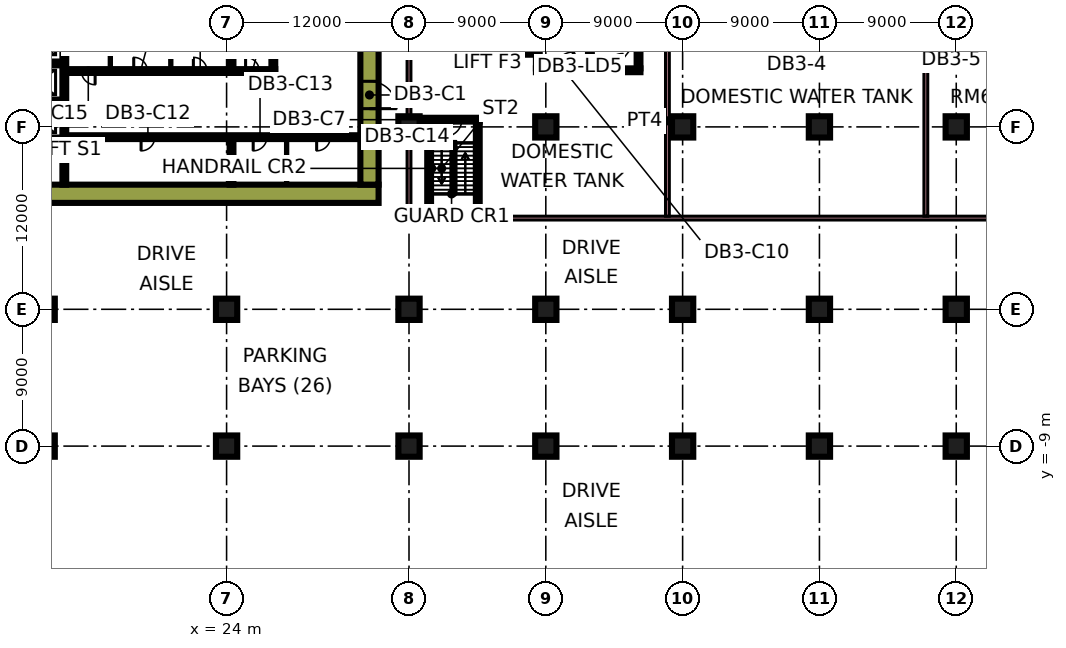
"""IFC4 building model, lengths in metres.
Left out: names, types, materials, properties, quantities, classifications, styles, units other than length and angle.
Written with IfcOpenShell. Run it as: python <this file> out.ifc"""

import sys

from ifc_helpers import new_model, si_unit, direction, frame, frame_2d, origin, origin_2d, place, context, subcontext, project, spatial, rectangle, extrude, element, fill, save


model = new_model("IFC4")
c1 = context("Model", 3, precision=1e-05, world=origin(), true_north=direction((0.0, 1.0)))
c2 = subcontext(c1, "Body", "Model", "MODEL_VIEW")
j1 = project(units=[si_unit("LENGTHUNIT", "METRE"), si_unit("PLANEANGLEUNIT", "RADIAN")], contexts=[c1])
p1 = place(None, origin())
s1 = spatial("IfcSite", under=j1, at=p1, CompositionType="ELEMENT")
p2 = place(p1, origin())
s2 = spatial("IfcBuilding", under=s1, at=p2, CompositionType="ELEMENT")
p3 = place(p2, frame((0.0, 0.0, -13.5)))
s3 = spatial("IfcBuildingStorey", under=s2, at=p3, CompositionType="ELEMENT", Elevation=-13.5)
for number, where, z_axis, x_axis in (
    (1, (12.0, -9.0, 0.0), (0.0, 0.0, 1.0), (1.0, 0.0, 0.0)),
    (2, (12.0, 0.0, 0.0), (0.0, 0.0, 1.0), (1.0, 0.0, 0.0)),
    (3, (24.0, -9.0, 0.0), (0.0, 0.0, 1.0), (1.0, 0.0, 0.0)),
    (4, (24.0, 0.0, 0.0), (0.0, 0.0, 1.0), (1.0, 0.0, 0.0)),
    (5, (36.0, -9.0, 0.0), (0.0, 0.0, 1.0), (1.0, 0.0, 0.0)),
    (6, (36.0, 0.0, 0.0), (0.0, 0.0, 1.0), (1.0, 0.0, 0.0)),
    (7, (36.0, 12.0, 0.0), (0.0, 0.0, 1.0), (1.0, 0.0, 0.0)),
    (8, (45.0, -9.0, 0.0), (0.0, 0.0, 1.0), (1.0, 0.0, 0.0)),
    (9, (45.0, 0.0, 0.0), (0.0, 0.0, 1.0), (1.0, 0.0, 0.0)),
    (10, (45.0, 12.0, 0.0), (0.0, 0.0, 1.0), (1.0, 0.0, 0.0)),
    (11, (54.0, -9.0, 0.0), (0.0, 0.0, 1.0), (1.0, 0.0, 0.0)),
    (12, (54.0, 0.0, 0.0), (0.0, 0.0, 1.0), (1.0, 0.0, 0.0)),
    (13, (54.0, 12.0, 0.0), (0.0, 0.0, 1.0), (1.0, 0.0, 0.0)),
    (14, (63.0, -9.0, 0.0), (0.0, 0.0, 1.0), (1.0, 0.0, 0.0)),
    (15, (63.0, 0.0, 0.0), (0.0, 0.0, 1.0), (1.0, 0.0, 0.0)),
    (16, (63.0, 12.0, 0.0), (0.0, 0.0, 1.0), (1.0, 0.0, 0.0)),
    (17, (72.0, -9.0, 0.0), (0.0, 0.0, 1.0), (1.0, 0.0, 0.0)),
    (18, (72.0, 0.0, 0.0), (0.0, 0.0, 1.0), (1.0, 0.0, 0.0)),
    (19, (72.0, 12.0, 0.0), (0.0, 0.0, 1.0), (1.0, 0.0, 0.0)),
):
    element("IfcColumn", number, at=place(p3, frame(where, z_axis=z_axis, x_axis=x_axis)), inside=s3, PredefinedType="COLUMN", context=c2, shape_type="SweptSolid", body=[
        extrude(rectangle(XDim=1.4, YDim=1.4, at=origin_2d()), origin(), (0.0, 0.0, 1.0), 4.5),
    ])
p4 = place(p3, frame((9.0, 7.6, 0.0), z_axis=(0.0, 0.0, 1.0), x_axis=(1.0, 0.0, 0.0)))
e20 = element("IfcWall", 20, at=p4, inside=s3, PredefinedType="SHEAR", context=c2, shape_type="SweptSolid", body=[
    extrude(rectangle(XDim=25.0, YDim=1.2, at=frame_2d((12.5, 0.0))), origin(), (0.0, 0.0, 1.0), 4.5),
])
p5 = place(p3, frame((33.4, 8.2, 0.0), z_axis=(0.0, 0.0, 1.0), x_axis=(0.0, 1.0, 0.0)))
e21 = element("IfcWall", 21, at=p5, inside=s3, PredefinedType="SHEAR", context=c2, shape_type="SweptSolid", body=[
    extrude(rectangle(XDim=10.6, YDim=1.2, at=frame_2d((5.3, 0.0))), origin(), (0.0, 0.0, 1.0), 4.5),
])
p6 = place(p5, frame((5.0, 0.0, 0.0)))
e22 = element("IfcOpeningElement", 22, at=p6, cuts=e21, PredefinedType="OPENING", context=c2, shape_type="SweptSolid", body=[
    extrude(rectangle(XDim=1.8, YDim=2.4, at=frame_2d((0.9, 1.2))), frame((0.0, 0.61, 0.0), z_axis=(0.0, -1.0, 0.0), x_axis=(1.0, 0.0, 0.0)), (0.0, 0.0, 1.0), 1.22),
])
p7 = place(p3, frame((13.325, 8.2, 0.0), z_axis=(0.0, 0.0, 1.0), x_axis=(0.0, 1.0, 0.0)))
e23 = element("IfcWall", 23, at=p7, inside=s3, PredefinedType="SHEAR", context=c2, shape_type="SweptSolid", body=[
    extrude(rectangle(XDim=10.6, YDim=0.25, at=frame_2d((5.3, 0.0))), origin(), (0.0, 0.0, 1.0), 4.5),
])
p8 = place(p3, frame((13.45, 11.325, 0.0), z_axis=(0.0, 0.0, 1.0), x_axis=(1.0, 0.0, 0.0)))
e24 = element("IfcWall", 24, at=p8, inside=s3, PredefinedType="SHEAR", context=c2, shape_type="SweptSolid", body=[
    extrude(rectangle(XDim=19.35, YDim=0.25, at=frame_2d((9.675, 0.0))), origin(), (0.0, 0.0, 1.0), 4.5),
])
p9 = place(p8, frame((4.925, 0.0, 0.0)))
e25 = element("IfcOpeningElement", 25, at=p9, cuts=e24, PredefinedType="OPENING", context=c2, shape_type="SweptSolid", body=[
    extrude(rectangle(XDim=0.9, YDim=2.1, at=frame_2d((0.45, 1.05))), frame((0.0, 0.135, 0.0), z_axis=(0.0, -1.0, 0.0), x_axis=(1.0, 0.0, 0.0)), (0.0, 0.0, 1.0), 0.27),
])
p10 = place(p8, frame((12.3, 0.0, 0.0)))
e26 = element("IfcOpeningElement", 26, at=p10, cuts=e24, PredefinedType="OPENING", context=c2, shape_type="SweptSolid", body=[
    extrude(rectangle(XDim=0.9, YDim=2.1, at=frame_2d((0.45, 1.05))), frame((0.0, 0.135, 0.0), z_axis=(0.0, -1.0, 0.0), x_axis=(1.0, 0.0, 0.0)), (0.0, 0.0, 1.0), 0.27),
])
p11 = place(p8, frame((16.475, 0.0, 0.0)))
e27 = element("IfcOpeningElement", 27, at=p11, cuts=e24, PredefinedType="OPENING", context=c2, shape_type="SweptSolid", body=[
    extrude(rectangle(XDim=0.9, YDim=2.1, at=frame_2d((0.45, 1.05))), frame((0.0, 0.135, 0.0), z_axis=(0.0, -1.0, 0.0), x_axis=(1.0, 0.0, 0.0)), (0.0, 0.0, 1.0), 0.27),
])
p12 = place(p3, frame((13.45, 15.675, 0.0), z_axis=(0.0, 0.0, 1.0), x_axis=(1.0, 0.0, 0.0)))
e28 = element("IfcWall", 28, at=p12, inside=s3, PredefinedType="SHEAR", context=c2, shape_type="SweptSolid", body=[
    extrude(rectangle(XDim=13.75, YDim=0.25, at=frame_2d((6.875, 0.0))), origin(), (0.0, 0.0, 1.0), 4.5),
])
p13 = place(p12, frame((1.001, 0.0, 0.0)))
e29 = element("IfcOpeningElement", 29, at=p13, cuts=e28, PredefinedType="OPENING", context=c2, shape_type="SweptSolid", body=[
    extrude(rectangle(XDim=0.9, YDim=2.1, at=frame_2d((0.45, 1.05))), frame((0.0, 0.135, 0.0), z_axis=(0.0, -1.0, 0.0), x_axis=(1.0, 0.0, 0.0)), (0.0, 0.0, 1.0), 0.27),
])
p14 = place(p12, frame((4.441, 0.0, 0.0)))
e30 = element("IfcOpeningElement", 30, at=p14, cuts=e28, PredefinedType="OPENING", context=c2, shape_type="SweptSolid", body=[
    extrude(rectangle(XDim=0.9, YDim=2.1, at=frame_2d((0.45, 1.05))), frame((0.0, 0.135, 0.0), z_axis=(0.0, -1.0, 0.0), x_axis=(1.0, 0.0, 0.0)), (0.0, 0.0, 1.0), 0.27),
])
p15 = place(p12, frame((8.365, 0.0, 0.0)))
e31 = element("IfcOpeningElement", 31, at=p15, cuts=e28, PredefinedType="OPENING", context=c2, shape_type="SweptSolid", body=[
    extrude(rectangle(XDim=0.9, YDim=2.1, at=frame_2d((0.45, 1.05))), frame((0.0, 0.135, 0.0), z_axis=(0.0, -1.0, 0.0), x_axis=(1.0, 0.0, 0.0)), (0.0, 0.0, 1.0), 0.27),
])
p16 = place(p12, frame((11.8, 0.0, 0.0)))
e32 = element("IfcOpeningElement", 32, at=p16, cuts=e28, PredefinedType="OPENING", context=c2, shape_type="SweptSolid", body=[
    extrude(rectangle(XDim=0.9, YDim=2.1, at=frame_2d((0.45, 1.05))), frame((0.0, 0.135, 0.0), z_axis=(0.0, -1.0, 0.0), x_axis=(1.0, 0.0, 0.0)), (0.0, 0.0, 1.0), 0.27),
])
for number, where, z_axis, x_axis in (
    (33, (10.2, 11.175, 0.0), (0.0, 0.0, 1.0), (1.0, 0.0, 0.0)),
    (34, (10.2, 13.675, 0.0), (0.0, 0.0, 1.0), (1.0, 0.0, 0.0)),
    (35, (10.2, 16.175, 0.0), (0.0, 0.0, 1.0), (1.0, 0.0, 0.0)),
    (36, (24.325, 8.2, 0.0), (0.0, 0.0, 1.0), (0.0, 1.0, 0.0)),
    (37, (24.325, 15.8, 0.0), (0.0, 0.0, 1.0), (0.0, 1.0, 0.0)),
    (38, (27.075, 15.8, 0.0), (0.0, 0.0, 1.0), (0.0, 1.0, 0.0)),
):
    element("IfcWall", number, at=place(p3, frame(where, z_axis=z_axis, x_axis=x_axis)), inside=s3, PredefinedType="SHEAR", context=c2, shape_type="SweptSolid", body=[
        extrude(rectangle(XDim=3.0, YDim=0.25, at=frame_2d((1.5, 0.0))), origin(), (0.0, 0.0, 1.0), 4.5),
    ])
p17 = place(p3, frame((37.2, 5.725, 0.0), z_axis=(0.0, 0.0, 1.0), x_axis=(1.0, 0.0, 0.0)))
e39 = element("IfcWall", 39, at=p17, inside=s3, PredefinedType="SHEAR", context=c2, shape_type="SweptSolid", body=[
    extrude(rectangle(XDim=3.45, YDim=0.25, at=frame_2d((1.725, 0.0))), origin(), (0.0, 0.0, 1.0), 4.5),
])
p18 = place(p3, frame((36.7, 12.475, 0.0), z_axis=(0.0, 0.0, 1.0), x_axis=(1.0, 0.0, 0.0)))
e40 = element("IfcWall", 40, at=p18, inside=s3, PredefinedType="SHEAR", context=c2, shape_type="SweptSolid", body=[
    extrude(rectangle(XDim=3.95, YDim=0.25, at=frame_2d((1.975, 0.0))), origin(), (0.0, 0.0, 1.0), 4.5),
])
p19 = place(p18, frame((1.675, 0.0, 0.0)))
e41 = element("IfcOpeningElement", 41, at=p19, cuts=e40, PredefinedType="OPENING", context=c2, shape_type="SweptSolid", body=[
    extrude(rectangle(XDim=1.1, YDim=2.2, at=frame_2d((0.55, 1.1))), frame((0.0, 0.135, 0.0), z_axis=(0.0, -1.0, 0.0), x_axis=(1.0, 0.0, 0.0)), (0.0, 0.0, 1.0), 0.27),
])
for number, where, z_axis, x_axis in (
    (42, (37.325, 5.85, 0.0), (0.0, 0.0, 1.0), (0.0, 1.0, 0.0)),
    (43, (40.525, 5.85, 0.0), (0.0, 0.0, 1.0), (0.0, 1.0, 0.0)),
):
    element("IfcWall", number, at=place(p3, frame(where, z_axis=z_axis, x_axis=x_axis)), inside=s3, PredefinedType="SHEAR", context=c2, shape_type="SweptSolid", body=[
        extrude(rectangle(XDim=6.5, YDim=0.25, at=frame_2d((3.25, 0.0))), origin(), (0.0, 0.0, 1.0), 4.5),
    ])
p20 = place(p3, frame((47.775, 15.725, 0.0), z_axis=(0.0, 0.0, 1.0), x_axis=(1.0, 0.0, 0.0)))
e44 = element("IfcWall", 44, at=p20, inside=s3, PredefinedType="SHEAR", context=c2, shape_type="SweptSolid", body=[
    extrude(rectangle(XDim=3.45, YDim=0.25, at=frame_2d((1.725, 0.0))), origin(), (0.0, 0.0, 1.0), 4.5),
])
p21 = place(p20, frame((1.175, 0.0, 0.0)))
e45 = element("IfcOpeningElement", 45, at=p21, cuts=e44, PredefinedType="OPENING", context=c2, shape_type="SweptSolid", body=[
    extrude(rectangle(XDim=1.1, YDim=2.2, at=frame_2d((0.55, 1.1))), frame((0.0, 0.135, 0.0), z_axis=(0.0, -1.0, 0.0), x_axis=(1.0, 0.0, 0.0)), (0.0, 0.0, 1.0), 0.27),
])
p22 = place(p3, frame((47.9, 15.85, 0.0), z_axis=(0.0, 0.0, 1.0), x_axis=(0.0, 1.0, 0.0)))
e46 = element("IfcWall", 46, at=p22, inside=s3, PredefinedType="SHEAR", context=c2, shape_type="SweptSolid", body=[
    extrude(rectangle(XDim=6.5, YDim=0.25, at=frame_2d((3.25, 0.0))), origin(), (0.0, 0.0, 1.0), 4.5),
])
p23 = place(p22, frame((0.35, 0.0, 0.0)))
e47 = element("IfcOpeningElement", 47, at=p23, cuts=e46, PredefinedType="OPENING", context=c2, shape_type="SweptSolid", body=[
    extrude(rectangle(XDim=1.1, YDim=2.2, at=frame_2d((0.55, 1.1))), frame((0.0, 0.135, 0.0), z_axis=(0.0, -1.0, 0.0), x_axis=(1.0, 0.0, 0.0)), (0.0, 0.0, 1.0), 0.27),
])
p24 = place(p3, frame((51.1, 15.85, 0.0), z_axis=(0.0, 0.0, 1.0), x_axis=(0.0, 1.0, 0.0)))
e48 = element("IfcWall", 48, at=p24, inside=s3, PredefinedType="SHEAR", context=c2, shape_type="SweptSolid", body=[
    extrude(rectangle(XDim=6.5, YDim=0.25, at=frame_2d((3.25, 0.0))), origin(), (0.0, 0.0, 1.0), 4.5),
])
p25 = place(p3, frame((44.35, 15.725, 0.0), z_axis=(0.0, 0.0, 1.0), x_axis=(1.0, 0.0, 0.0)))
e49 = element("IfcWall", 49, at=p25, inside=s3, PredefinedType="SHEAR", context=c2, shape_type="SweptSolid", body=[
    extrude(rectangle(XDim=3.425, YDim=0.25, at=frame_2d((1.712, 0.0))), origin(), (0.0, 0.0, 1.0), 4.5),
])
p26 = place(p25, frame((1.25, 0.0, 0.0)))
e50 = element("IfcOpeningElement", 50, at=p26, cuts=e49, PredefinedType="OPENING", context=c2, shape_type="SweptSolid", body=[
    extrude(rectangle(XDim=1.2, YDim=2.2, at=frame_2d((0.6, 1.1))), frame((0.0, 0.135, 0.0), z_axis=(0.0, -1.0, 0.0), x_axis=(1.0, 0.0, 0.0)), (0.0, 0.0, 1.0), 0.27),
])
p27 = place(p3, frame((44.475, 15.85, 0.0), z_axis=(0.0, 0.0, 1.0), x_axis=(0.0, 1.0, 0.0)))
e51 = element("IfcWall", 51, at=p27, inside=s3, PredefinedType="SHEAR", context=c2, shape_type="SweptSolid", body=[
    extrude(rectangle(XDim=6.5, YDim=0.25, at=frame_2d((3.25, 0.0))), origin(), (0.0, 0.0, 1.0), 4.5),
])
p28 = place(p27, frame((1.75, 0.0, 0.0)))
e52 = element("IfcOpeningElement", 52, at=p28, cuts=e51, PredefinedType="OPENING", context=c2, shape_type="SweptSolid", body=[
    extrude(rectangle(XDim=1.1, YDim=2.2, at=frame_2d((0.55, 1.1))), frame((0.0, 0.135, 0.0), z_axis=(0.0, -1.0, 0.0), x_axis=(1.0, 0.0, 0.0)), (0.0, 0.0, 1.0), 0.27),
])
p29 = place(p27, frame((4.3, 0.0, 0.0)))
e53 = element("IfcOpeningElement", 53, at=p29, cuts=e51, PredefinedType="OPENING", context=c2, shape_type="SweptSolid", body=[
    extrude(rectangle(XDim=1.1, YDim=2.2, at=frame_2d((0.55, 1.1))), frame((0.0, 0.135, 0.0), z_axis=(0.0, -1.0, 0.0), x_axis=(1.0, 0.0, 0.0)), (0.0, 0.0, 1.0), 0.27),
])
p30 = place(p3, frame((41.5, 16.875, 0.0), z_axis=(0.0, 0.0, 1.0), x_axis=(1.0, 0.0, 0.0)))
e54 = element("IfcWall", 54, at=p30, inside=s3, PredefinedType="SHEAR", context=c2, shape_type="SweptSolid", body=[
    extrude(rectangle(XDim=2.85, YDim=0.25, at=frame_2d((1.425, 0.0))), origin(), (0.0, 0.0, 1.0), 4.5),
])
for number, where, z_axis, x_axis in (
    (55, (27.95, 8.2, 0.0), (0.0, 0.0, 1.0), (0.0, 1.0, 0.0)),
    (56, (16.353, 15.8, 0.0), (0.0, 0.0, 1.0), (0.0, 1.0, 0.0)),
    (57, (20.33, 15.8, 0.0), (0.0, 0.0, 1.0), (0.0, 1.0, 0.0)),
):
    element("IfcWall", number, at=place(p3, frame(where, z_axis=z_axis, x_axis=x_axis)), inside=s3, PredefinedType="PARTITIONING", context=c2, shape_type="SweptSolid", body=[
        extrude(rectangle(XDim=3.0, YDim=0.15, at=frame_2d((1.5, 0.0))), origin(), (0.0, 0.0, 1.0), 4.05),
    ])
p31 = place(p3, frame((36.0, 5.875, 0.0), z_axis=(0.0, 0.0, 1.0), x_axis=(0.0, 1.0, 0.0)))
e58 = element("IfcWall", 58, at=p31, inside=s3, PredefinedType="PARTITIONING", context=c2, shape_type="SweptSolid", body=[
    extrude(rectangle(XDim=5.426, YDim=0.25, at=frame_2d((2.713, 0.0))), origin(), (0.0, 0.0, 1.0), 4.05),
])
p32 = place(p3, frame((36.0, 12.699, 0.0), z_axis=(0.0, 0.0, 1.0), x_axis=(0.0, 1.0, 0.0)))
e59 = element("IfcWall", 59, at=p32, inside=s3, PredefinedType="PARTITIONING", context=c2, shape_type="SweptSolid", body=[
    extrude(rectangle(XDim=6.101, YDim=0.25, at=frame_2d((3.051, 0.0))), origin(), (0.0, 0.0, 1.0), 4.05),
])
p33 = place(p3, frame((36.125, 6.0, 0.0), z_axis=(0.0, 0.0, 1.0), x_axis=(1.0, 0.0, 0.0)))
e60 = element("IfcWall", 60, at=p33, inside=s3, PredefinedType="PARTITIONING", context=c2, shape_type="SweptSolid", body=[
    extrude(rectangle(XDim=1.075, YDim=0.25, at=frame_2d((0.538, 0.0))), origin(), (0.0, 0.0, 1.0), 4.05),
])
p34 = place(p3, frame((40.65, 6.0, 0.0), z_axis=(0.0, 0.0, 1.0), x_axis=(1.0, 0.0, 0.0)))
e61 = element("IfcWall", 61, at=p34, inside=s3, PredefinedType="PARTITIONING", context=c2, shape_type="SweptSolid", body=[
    extrude(rectangle(XDim=35.475, YDim=0.25, at=frame_2d((17.738, 0.0))), origin(), (0.0, 0.0, 1.0), 4.05),
])
for number, where, z_axis, x_axis in (
    (62, (53.0, 6.125, 0.0), (0.0, 0.0, 1.0), (0.0, 1.0, 0.0)),
    (63, (70.0, 6.125, 0.0), (0.0, 0.0, 1.0), (0.0, 1.0, 0.0)),
):
    element("IfcWall", number, at=place(p3, frame(where, z_axis=z_axis, x_axis=x_axis)), inside=s3, PredefinedType="PARTITIONING", context=c2, shape_type="SweptSolid", body=[
        extrude(rectangle(XDim=12.55, YDim=0.25, at=frame_2d((6.275, 0.0))), origin(), (0.0, 0.0, 1.0), 4.05),
    ])
p35 = place(p6, frame((1.8, 0.0, 0.0), z_axis=(0.0, 0.0, 1.0), x_axis=(-1.0, 0.0, 0.0)))
e64 = element("IfcDoor", 64, at=p35, inside=s3, OperationType="DOUBLE_DOOR_SINGLE_SWING", PredefinedType="DOOR", context=c2, shape_type="SweptSolid", body=[
    extrude(rectangle(XDim=1.8, YDim=2.4, at=frame_2d((0.9, 1.2))), frame((0.0, 0.025, 0.0), z_axis=(0.0, -1.0, 0.0), x_axis=(1.0, 0.0, 0.0)), (0.0, 0.0, 1.0), 0.05),
])
fill(e22, e64)
p36 = place(p19, frame((1.1, 0.0, 0.0), z_axis=(0.0, 0.0, 1.0), x_axis=(-1.0, 0.0, 0.0)))
e65 = element("IfcDoor", 65, at=p36, inside=s3, OperationType="SINGLE_SWING_LEFT", PredefinedType="DOOR", context=c2, shape_type="SweptSolid", body=[
    extrude(rectangle(XDim=1.1, YDim=2.2, at=frame_2d((0.55, 1.1))), frame((0.0, 0.025, 0.0), z_axis=(0.0, -1.0, 0.0), x_axis=(1.0, 0.0, 0.0)), (0.0, 0.0, 1.0), 0.05),
])
fill(e41, e65)
p37 = place(p21, frame((1.1, 0.0, 0.0), z_axis=(0.0, 0.0, 1.0), x_axis=(-1.0, 0.0, 0.0)))
e66 = element("IfcDoor", 66, at=p37, inside=s3, OperationType="SINGLE_SWING_RIGHT", PredefinedType="DOOR", context=c2, shape_type="SweptSolid", body=[
    extrude(rectangle(XDim=1.1, YDim=2.2, at=frame_2d((0.55, 1.1))), frame((0.0, 0.025, 0.0), z_axis=(0.0, -1.0, 0.0), x_axis=(1.0, 0.0, 0.0)), (0.0, 0.0, 1.0), 0.05),
])
fill(e45, e66)
p38 = place(p26, frame((1.2, 0.0, 0.0), z_axis=(0.0, 0.0, 1.0), x_axis=(-1.0, 0.0, 0.0)))
e67 = element("IfcDoor", 67, at=p38, inside=s3, OperationType="SINGLE_SWING_RIGHT", PredefinedType="DOOR", context=c2, shape_type="SweptSolid", body=[
    extrude(rectangle(XDim=1.2, YDim=2.2, at=frame_2d((0.6, 1.1))), frame((0.0, 0.025, 0.0), z_axis=(0.0, -1.0, 0.0), x_axis=(1.0, 0.0, 0.0)), (0.0, 0.0, 1.0), 0.05),
])
fill(e50, e67)
p39 = place(p23, frame((1.1, 0.0, 0.0), z_axis=(0.0, 0.0, 1.0), x_axis=(-1.0, 0.0, 0.0)))
e68 = element("IfcDoor", 68, at=p39, inside=s3, OperationType="SINGLE_SWING_RIGHT", PredefinedType="DOOR", context=c2, shape_type="SweptSolid", body=[
    extrude(rectangle(XDim=1.1, YDim=2.2, at=frame_2d((0.55, 1.1))), frame((0.0, 0.025, 0.0), z_axis=(0.0, -1.0, 0.0), x_axis=(1.0, 0.0, 0.0)), (0.0, 0.0, 1.0), 0.05),
])
fill(e47, e68)
p40 = place(p9, frame((0.9, 0.0, 0.0), z_axis=(0.0, 0.0, 1.0), x_axis=(-1.0, 0.0, 0.0)))
e69 = element("IfcDoor", 69, at=p40, inside=s3, OperationType="SINGLE_SWING_LEFT", PredefinedType="DOOR", context=c2, shape_type="SweptSolid", body=[
    extrude(rectangle(XDim=0.9, YDim=2.1, at=frame_2d((0.45, 1.05))), frame((0.0, 0.025, 0.0), z_axis=(0.0, -1.0, 0.0), x_axis=(1.0, 0.0, 0.0)), (0.0, 0.0, 1.0), 0.05),
])
fill(e25, e69)
p41 = place(p10, frame((0.9, 0.0, 0.0), z_axis=(0.0, 0.0, 1.0), x_axis=(-1.0, 0.0, 0.0)))
e70 = element("IfcDoor", 70, at=p41, inside=s3, OperationType="SINGLE_SWING_LEFT", PredefinedType="DOOR", context=c2, shape_type="SweptSolid", body=[
    extrude(rectangle(XDim=0.9, YDim=2.1, at=frame_2d((0.45, 1.05))), frame((0.0, 0.025, 0.0), z_axis=(0.0, -1.0, 0.0), x_axis=(1.0, 0.0, 0.0)), (0.0, 0.0, 1.0), 0.05),
])
fill(e26, e70)
p42 = place(p11, frame((0.9, 0.0, 0.0), z_axis=(0.0, 0.0, 1.0), x_axis=(-1.0, 0.0, 0.0)))
e71 = element("IfcDoor", 71, at=p42, inside=s3, OperationType="SINGLE_SWING_LEFT", PredefinedType="DOOR", context=c2, shape_type="SweptSolid", body=[
    extrude(rectangle(XDim=0.9, YDim=2.1, at=frame_2d((0.45, 1.05))), frame((0.0, 0.025, 0.0), z_axis=(0.0, -1.0, 0.0), x_axis=(1.0, 0.0, 0.0)), (0.0, 0.0, 1.0), 0.05),
])
fill(e27, e71)
p43 = place(p13, origin())
e72 = element("IfcDoor", 72, at=p43, inside=s3, OperationType="SINGLE_SWING_RIGHT", PredefinedType="DOOR", context=c2, shape_type="SweptSolid", body=[
    extrude(rectangle(XDim=0.9, YDim=2.1, at=frame_2d((0.45, 1.05))), frame((0.0, 0.025, 0.0), z_axis=(0.0, -1.0, 0.0), x_axis=(1.0, 0.0, 0.0)), (0.0, 0.0, 1.0), 0.05),
])
fill(e29, e72)
p44 = place(p14, origin())
e73 = element("IfcDoor", 73, at=p44, inside=s3, OperationType="SINGLE_SWING_LEFT", PredefinedType="DOOR", context=c2, shape_type="SweptSolid", body=[
    extrude(rectangle(XDim=0.9, YDim=2.1, at=frame_2d((0.45, 1.05))), frame((0.0, 0.025, 0.0), z_axis=(0.0, -1.0, 0.0), x_axis=(1.0, 0.0, 0.0)), (0.0, 0.0, 1.0), 0.05),
])
fill(e30, e73)
p45 = place(p15, origin())
e74 = element("IfcDoor", 74, at=p45, inside=s3, OperationType="SINGLE_SWING_LEFT", PredefinedType="DOOR", context=c2, shape_type="SweptSolid", body=[
    extrude(rectangle(XDim=0.9, YDim=2.1, at=frame_2d((0.45, 1.05))), frame((0.0, 0.025, 0.0), z_axis=(0.0, -1.0, 0.0), x_axis=(1.0, 0.0, 0.0)), (0.0, 0.0, 1.0), 0.05),
])
fill(e31, e74)
p46 = place(p16, origin())
e75 = element("IfcDoor", 75, at=p46, inside=s3, OperationType="SINGLE_SWING_LEFT", PredefinedType="DOOR", context=c2, shape_type="SweptSolid", body=[
    extrude(rectangle(XDim=0.9, YDim=2.1, at=frame_2d((0.45, 1.05))), frame((0.0, 0.025, 0.0), z_axis=(0.0, -1.0, 0.0), x_axis=(1.0, 0.0, 0.0)), (0.0, 0.0, 1.0), 0.05),
])
fill(e32, e75)
save(model, sys.argv[1])
